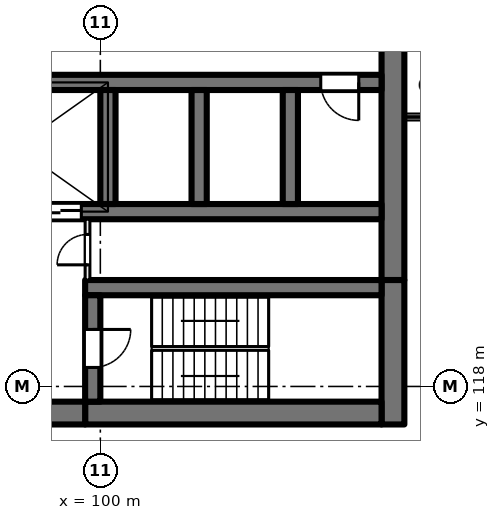
"""IFC4 building model, lengths in metres.
Left out: names, types, materials, properties, quantities, classifications, styles, units other than length and angle.
Written with IfcOpenShell. Run it as: python <this file> out.ifc"""

import sys

from ifc_helpers import new_model, si_unit, direction, frame, frame_2d, origin, place, context, subcontext, project, spatial, rectangle, extrude, element, fill, save


model = new_model("IFC4")
c1 = context("Model", 3, precision=1e-05, world=origin(), true_north=direction((0.0, 1.0)))
c2 = subcontext(c1, "Body", "Model", "MODEL_VIEW")
j1 = project(units=[si_unit("LENGTHUNIT", "METRE"), si_unit("PLANEANGLEUNIT", "RADIAN")], contexts=[c1])
p1 = place(None, origin())
s1 = spatial("IfcSite", under=j1, at=p1, CompositionType="ELEMENT")
p2 = place(p1, origin())
s2 = spatial("IfcBuilding", under=s1, at=p2, CompositionType="ELEMENT")
p3 = place(p2, frame((0.0, 0.0, 113.0)))
s3 = spatial("IfcBuildingStorey", under=s2, at=p3, CompositionType="ELEMENT", Elevation=113.0)
p4 = place(p3, frame((107.7, 135.2, 0.0), z_axis=(0.0, 0.0, 1.0), x_axis=(0.0, -1.0, 0.0)))
e1 = element("IfcWall", 1, at=p4, inside=s3, PredefinedType="SHEAR", context=c2, shape_type="SweptSolid", body=[
    extrude(rectangle(XDim=14.4, YDim=0.6, at=frame_2d((7.2, 0.0))), origin(), (0.0, 0.0, 1.0), 4.0),
])
p5 = place(p3, frame((107.7, 120.8, 0.0), z_axis=(0.0, 0.0, 1.0), x_axis=(0.0, -1.0, 0.0)))
e2 = element("IfcWall", 2, at=p5, inside=s3, PredefinedType="SHEAR", context=c2, shape_type="SweptSolid", body=[
    extrude(rectangle(XDim=3.8, YDim=0.6, at=frame_2d((1.9, 0.0))), origin(), (0.0, 0.0, 1.0), 4.0),
])
p6 = place(p3, frame((107.4, 117.3, 0.0), z_axis=(0.0, 0.0, 1.0), x_axis=(-1.0, 0.0, 0.0)))
e3 = element("IfcWall", 3, at=p6, inside=s3, PredefinedType="SHEAR", context=c2, shape_type="SweptSolid", body=[
    extrude(rectangle(XDim=7.8, YDim=0.6, at=frame_2d((3.9, 0.0))), origin(), (0.0, 0.0, 1.0), 4.0),
])
p7 = place(p3, frame((99.6, 117.3, 0.0), z_axis=(0.0, 0.0, 1.0), x_axis=(-1.0, 0.0, 0.0)))
e4 = element("IfcWall", 4, at=p7, inside=s3, PredefinedType="SHEAR", context=c2, shape_type="SweptSolid", body=[
    extrude(rectangle(XDim=8.925, YDim=0.6, at=frame_2d((4.462, 0.0))), origin(), (0.0, 0.0, 1.0), 4.0),
])
p8 = place(p3, frame((107.4, 120.6, 0.0), z_axis=(0.0, 0.0, 1.0), x_axis=(-1.0, 0.0, 0.0)))
e5 = element("IfcWall", 5, at=p8, inside=s3, PredefinedType="SHEAR", context=c2, shape_type="SweptSolid", body=[
    extrude(rectangle(XDim=7.8, YDim=0.4, at=frame_2d((3.9, 0.0))), origin(), (0.0, 0.0, 1.0), 4.0),
])
p9 = place(p3, frame((99.8, 120.4, 0.0), z_axis=(0.0, 0.0, 1.0), x_axis=(0.0, -1.0, 0.0)))
e6 = element("IfcWall", 6, at=p9, inside=s3, PredefinedType="SHEAR", context=c2, shape_type="SweptSolid", body=[
    extrude(rectangle(XDim=2.8, YDim=0.4, at=frame_2d((1.4, 0.0))), origin(), (0.0, 0.0, 1.0), 4.0),
])
p10 = place(p9, frame((0.9, 0.0, 0.0)))
e7 = element("IfcOpeningElement", 7, at=p10, cuts=e6, PredefinedType="OPENING", context=c2, shape_type="SweptSolid", body=[
    extrude(rectangle(XDim=1.0, YDim=2.1, at=frame_2d((0.5, 1.05))), frame((0.0, 0.21, 0.0), z_axis=(0.0, -1.0, 0.0), x_axis=(1.0, 0.0, 0.0)), (0.0, 0.0, 1.0), 0.42),
])
p11 = place(p3, frame((107.4, 126.0, 0.0), z_axis=(0.0, 0.0, 1.0), x_axis=(-1.0, 0.0, 0.0)))
e8 = element("IfcWall", 8, at=p11, inside=s3, PredefinedType="SHEAR", context=c2, shape_type="SweptSolid", body=[
    extrude(rectangle(XDim=12.2, YDim=0.4, at=frame_2d((6.1, 0.0))), origin(), (0.0, 0.0, 1.0), 4.0),
])
p12 = place(p11, frame((10.25, 0.0, 0.0)))
e9 = element("IfcOpeningElement", 9, at=p12, cuts=e8, PredefinedType="OPENING", context=c2, shape_type="SweptSolid", body=[
    extrude(rectangle(XDim=1.1, YDim=2.1, at=frame_2d((0.55, 1.05))), frame((0.0, 0.21, 0.0), z_axis=(0.0, -1.0, 0.0), x_axis=(1.0, 0.0, 0.0)), (0.0, 0.0, 1.0), 0.42),
])
p13 = place(p11, frame((0.6, 0.0, 0.0)))
e10 = element("IfcOpeningElement", 10, at=p13, cuts=e8, PredefinedType="OPENING", context=c2, shape_type="SweptSolid", body=[
    extrude(rectangle(XDim=1.0, YDim=2.1, at=frame_2d((0.5, 1.05))), frame((0.0, 0.21, 0.0), z_axis=(0.0, -1.0, 0.0), x_axis=(1.0, 0.0, 0.0)), (0.0, 0.0, 1.0), 0.42),
])
p14 = place(p3, frame((107.4, 122.6, 0.0), z_axis=(0.0, 0.0, 1.0), x_axis=(-1.0, 0.0, 0.0)))
e11 = element("IfcWall", 11, at=p14, inside=s3, PredefinedType="SHEAR", context=c2, shape_type="SweptSolid", body=[
    extrude(rectangle(XDim=12.2, YDim=0.4, at=frame_2d((6.1, 0.0))), origin(), (0.0, 0.0, 1.0), 4.0),
])
p15 = place(p14, frame((7.9, 0.0, 0.0)))
e12 = element("IfcOpeningElement", 12, at=p15, cuts=e11, PredefinedType="OPENING", context=c2, shape_type="SweptSolid", body=[
    extrude(rectangle(XDim=1.1, YDim=2.1, at=frame_2d((0.55, 1.05))), frame((0.0, 0.21, 0.0), z_axis=(0.0, -1.0, 0.0), x_axis=(1.0, 0.0, 0.0)), (0.0, 0.0, 1.0), 0.42),
])
for number, where, z_axis, x_axis in (
    (13, (105.0, 125.8, 0.0), (0.0, 0.0, 1.0), (0.0, -1.0, 0.0)),
    (14, (102.6, 125.8, 0.0), (0.0, 0.0, 1.0), (0.0, -1.0, 0.0)),
    (15, (100.2, 125.8, 0.0), (0.0, 0.0, 1.0), (0.0, -1.0, 0.0)),
):
    element("IfcWall", number, at=place(p3, frame(where, z_axis=z_axis, x_axis=x_axis)), inside=s3, PredefinedType="SHEAR", context=c2, shape_type="SweptSolid", body=[
        extrude(rectangle(XDim=3.0, YDim=0.4, at=frame_2d((1.5, 0.0))), origin(), (0.0, 0.0, 1.0), 4.0),
    ])
p16 = place(p3, frame((99.663, 120.8, 0.0), z_axis=(0.0, 0.0, 1.0), x_axis=(0.0, 1.0, 0.0)))
e16 = element("IfcWall", 16, at=p16, inside=s3, PredefinedType="PARTITIONING", context=c2, shape_type="SweptSolid", body=[
    extrude(rectangle(XDim=1.6, YDim=0.125, at=frame_2d((0.8, 0.0))), origin(), (0.0, 0.0, 1.0), 3.625),
])
p17 = place(p16, frame((0.4, 0.0, 0.0)))
e17 = element("IfcOpeningElement", 17, at=p17, cuts=e16, PredefinedType="OPENING", context=c2, shape_type="SweptSolid", body=[
    extrude(rectangle(XDim=0.8, YDim=2.1, at=frame_2d((0.4, 1.05))), frame((0.0, 0.073, 0.0), z_axis=(0.0, -1.0, 0.0), x_axis=(1.0, 0.0, 0.0)), (0.0, 0.0, 1.0), 0.145),
])
p18 = place(p13, origin())
e18 = element("IfcDoor", 18, at=p18, inside=s3, OperationType="SINGLE_SWING_LEFT", PredefinedType="DOOR", context=c2, shape_type="SweptSolid", body=[
    extrude(rectangle(XDim=1.0, YDim=2.1, at=frame_2d((0.5, 1.05))), frame((0.0, 0.025, 0.0), z_axis=(0.0, -1.0, 0.0), x_axis=(1.0, 0.0, 0.0)), (0.0, 0.0, 1.0), 0.05),
])
fill(e10, e18)
p19 = place(p10, origin())
e19 = element("IfcDoor", 19, at=p19, inside=s3, OperationType="SINGLE_SWING_LEFT", PredefinedType="DOOR", context=c2, shape_type="SweptSolid", body=[
    extrude(rectangle(XDim=1.0, YDim=2.1, at=frame_2d((0.5, 1.05))), frame((0.0, 0.025, 0.0), z_axis=(0.0, -1.0, 0.0), x_axis=(1.0, 0.0, 0.0)), (0.0, 0.0, 1.0), 0.05),
])
fill(e7, e19)
p20 = place(p17, origin())
e20 = element("IfcDoor", 20, at=p20, inside=s3, OperationType="SINGLE_SWING_RIGHT", PredefinedType="DOOR", context=c2, shape_type="SweptSolid", body=[
    extrude(rectangle(XDim=0.8, YDim=2.1, at=frame_2d((0.4, 1.05))), frame((0.0, 0.025, 0.0), z_axis=(0.0, -1.0, 0.0), x_axis=(1.0, 0.0, 0.0)), (0.0, 0.0, 1.0), 0.05),
])
fill(e17, e20)
p21 = place(p15, origin())
e21 = element("IfcDoor", 21, at=p21, inside=s3, OperationType="DOUBLE_DOOR_SLIDING", PredefinedType="DOOR", context=c2, shape_type="SweptSolid", body=[
    extrude(rectangle(XDim=1.1, YDim=2.1, at=frame_2d((0.55, 1.05))), frame((0.0, 0.025, 0.0), z_axis=(0.0, -1.0, 0.0), x_axis=(1.0, 0.0, 0.0)), (0.0, 0.0, 1.0), 0.05),
])
fill(e12, e21)
save(model, sys.argv[1])
